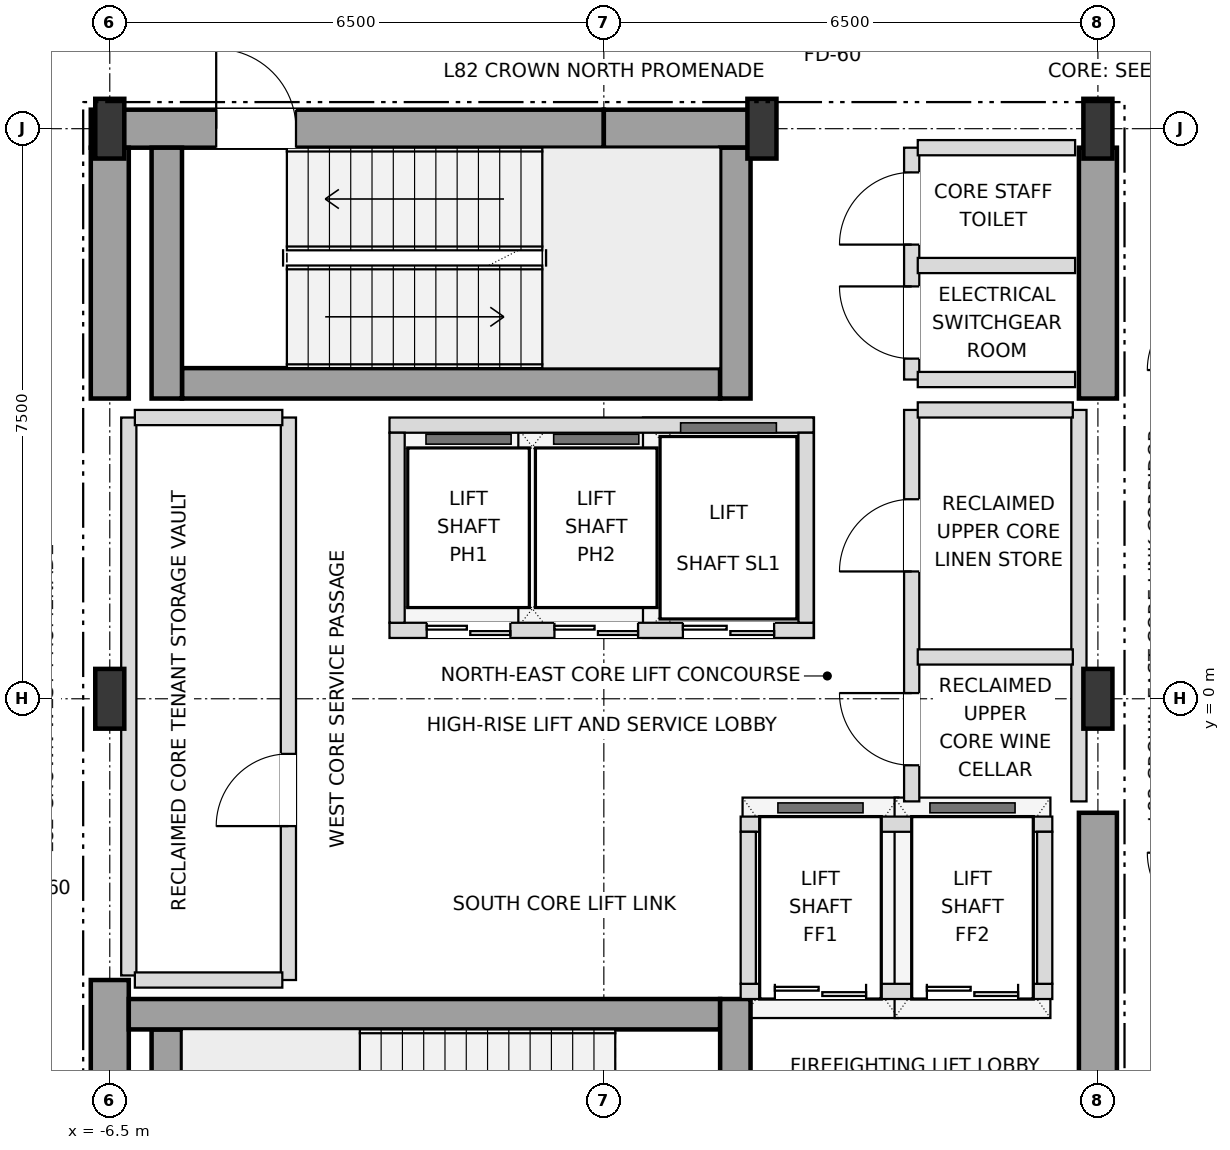
"""IFC4 building model, lengths in metres.
Left out: names, types, materials, properties, quantities, classifications, styles, units other than length and angle.
Written with IfcOpenShell. Run it as: python <this file> out.ifc"""

import sys

from ifc_helpers import new_model, si_unit, direction, frame, frame_2d, origin, origin_2d, place, context, subcontext, project, spatial, rectangle, i_section, extrude, element, fill, save


model = new_model("IFC4")
c1 = context("Model", 3, precision=1e-05, world=origin(), true_north=direction((0.0, 1.0)))
c2 = subcontext(c1, "Body", "Model", "MODEL_VIEW")
j1 = project(units=[si_unit("LENGTHUNIT", "METRE"), si_unit("PLANEANGLEUNIT", "RADIAN")], contexts=[c1])
p1 = place(None, origin())
s1 = spatial("IfcSite", under=j1, at=p1, CompositionType="ELEMENT")
p2 = place(p1, origin())
s2 = spatial("IfcBuilding", under=s1, at=p2, CompositionType="ELEMENT")
p3 = place(p2, frame((0.0, 0.0, 314.4)))
s3 = spatial("IfcBuildingStorey", under=s2, at=p3, CompositionType="ELEMENT", Elevation=314.4)
for number, where, z_axis, x_axis in (
    (1, (-6.5, 0.0, 0.0), (0.0, 0.0, 1.0), (1.0, 0.0, 0.0)),
    (2, (6.5, 0.0, 0.0), (0.0, 0.0, 1.0), (1.0, 0.0, 0.0)),
    (3, (-6.5, 7.5, 0.0), (0.0, 0.0, 1.0), (1.0, 0.0, 0.0)),
    (4, (2.08, 7.5, 0.0), (0.0, 0.0, 1.0), (1.0, 0.0, 0.0)),
    (5, (6.5, 7.5, 0.0), (0.0, 0.0, 1.0), (1.0, 0.0, 0.0)),
):
    element("IfcColumn", number, at=place(p3, frame(where, z_axis=z_axis, x_axis=x_axis)), inside=s3, PredefinedType="COLUMN", context=c2, shape_type="SweptSolid", body=[
        extrude(i_section(OverallWidth=0.382, OverallDepth=0.786, WebThickness=0.02, FlangeThickness=0.033, at=origin_2d()), origin(), (0.0, 0.0, 1.0), 4.5),
    ])
p4 = place(p3, frame((-6.75, 7.5, 0.0), z_axis=(0.0, 0.0, 1.0), x_axis=(1.0, 0.0, 0.0)))
e6 = element("IfcWall", 6, at=p4, inside=s3, PredefinedType="SHEAR", context=c2, shape_type="SweptSolid", body=[
    extrude(rectangle(XDim=6.75, YDim=0.5, at=frame_2d((3.375, 0.0))), origin(), (0.0, 0.0, 1.0), 4.25),
])
p5 = place(p4, frame((1.65, 0.0, 0.0)))
e7 = element("IfcOpeningElement", 7, at=p5, cuts=e6, PredefinedType="OPENING", context=c2, shape_type="SweptSolid", body=[
    extrude(rectangle(XDim=1.05, YDim=2.15, at=frame_2d((0.525, 1.075))), frame((0.0, 0.26, 0.0), z_axis=(0.0, -1.0, 0.0), x_axis=(1.0, 0.0, 0.0)), (0.0, 0.0, 1.0), 0.52),
])
p6 = place(p3, frame((0.0, 7.5, 0.0), z_axis=(0.0, 0.0, 1.0), x_axis=(1.0, 0.0, 0.0)))
e8 = element("IfcWall", 8, at=p6, inside=s3, PredefinedType="SHEAR", context=c2, shape_type="SweptSolid", body=[
    extrude(rectangle(XDim=2.08, YDim=0.5, at=frame_2d((1.04, 0.0))), origin(), (0.0, 0.0, 1.0), 4.25),
])
p7 = place(p3, frame((-6.5, -7.25, 0.0), z_axis=(0.0, 0.0, 1.0), x_axis=(0.0, 1.0, 0.0)))
e9 = element("IfcWall", 9, at=p7, inside=s3, PredefinedType="SHEAR", context=c2, shape_type="SweptSolid", body=[
    extrude(rectangle(XDim=3.55, YDim=0.5, at=frame_2d((1.775, 0.0))), origin(), (0.0, 0.0, 1.0), 4.25),
])
p8 = place(p3, frame((-6.5, 3.95, 0.0), z_axis=(0.0, 0.0, 1.0), x_axis=(0.0, 1.0, 0.0)))
e10 = element("IfcWall", 10, at=p8, inside=s3, PredefinedType="SHEAR", context=c2, shape_type="SweptSolid", body=[
    extrude(rectangle(XDim=3.3, YDim=0.5, at=frame_2d((1.65, 0.0))), origin(), (0.0, 0.0, 1.0), 4.25),
])
p9 = place(p3, frame((6.5, -7.25, 0.0), z_axis=(0.0, 0.0, 1.0), x_axis=(0.0, 1.0, 0.0)))
e11 = element("IfcWall", 11, at=p9, inside=s3, PredefinedType="SHEAR", context=c2, shape_type="SweptSolid", body=[
    extrude(rectangle(XDim=5.75, YDim=0.5, at=frame_2d((2.875, 0.0))), origin(), (0.0, 0.0, 1.0), 4.25),
])
p10 = place(p9, frame((0.85, 0.0, 0.0)))
e12 = element("IfcOpeningElement", 12, at=p10, cuts=e11, PredefinedType="OPENING", context=c2, shape_type="SweptSolid", body=[
    extrude(rectangle(XDim=1.05, YDim=2.15, at=frame_2d((0.525, 1.075))), frame((0.0, 0.26, 0.0), z_axis=(0.0, -1.0, 0.0), x_axis=(1.0, 0.0, 0.0)), (0.0, 0.0, 1.0), 0.52),
])
p11 = place(p3, frame((6.5, 3.95, 0.0), z_axis=(0.0, 0.0, 1.0), x_axis=(0.0, 1.0, 0.0)))
e13 = element("IfcWall", 13, at=p11, inside=s3, PredefinedType="SHEAR", context=c2, shape_type="SweptSolid", body=[
    extrude(rectangle(XDim=3.3, YDim=0.5, at=frame_2d((1.65, 0.0))), origin(), (0.0, 0.0, 1.0), 4.25),
])
p12 = place(p3, frame((-5.75, -7.25, 0.0), z_axis=(0.0, 0.0, 1.0), x_axis=(0.0, 1.0, 0.0)))
e14 = element("IfcWall", 14, at=p12, inside=s3, PredefinedType="SHEAR", context=c2, shape_type="SweptSolid", body=[
    extrude(rectangle(XDim=2.9, YDim=0.4, at=frame_2d((1.45, 0.0))), origin(), (0.0, 0.0, 1.0), 4.25),
])
p13 = place(p3, frame((-6.25, -4.15, 0.0), z_axis=(0.0, 0.0, 1.0), x_axis=(1.0, 0.0, 0.0)))
e15 = element("IfcWall", 15, at=p13, inside=s3, PredefinedType="SHEAR", context=c2, shape_type="SweptSolid", body=[
    extrude(rectangle(XDim=7.78, YDim=0.4, at=frame_2d((3.89, 0.0))), origin(), (0.0, 0.0, 1.0), 4.25),
])
p14 = place(p3, frame((1.73, -7.25, 0.0), z_axis=(0.0, 0.0, 1.0), x_axis=(0.0, 1.0, 0.0)))
e16 = element("IfcWall", 16, at=p14, inside=s3, PredefinedType="SHEAR", context=c2, shape_type="SweptSolid", body=[
    extrude(rectangle(XDim=3.3, YDim=0.4, at=frame_2d((1.65, 0.0))), origin(), (0.0, 0.0, 1.0), 4.25),
])
p15 = place(p14, frame((0.9, 0.0, 0.0)))
e17 = element("IfcOpeningElement", 17, at=p15, cuts=e16, PredefinedType="OPENING", context=c2, shape_type="SweptSolid", body=[
    extrude(rectangle(XDim=1.05, YDim=2.15, at=frame_2d((0.525, 1.075))), frame((0.0, 0.21, 0.0), z_axis=(0.0, -1.0, 0.0), x_axis=(1.0, 0.0, 0.0)), (0.0, 0.0, 1.0), 0.42),
])
p16 = place(p3, frame((-5.55, 4.15, 0.0), z_axis=(0.0, 0.0, 1.0), x_axis=(1.0, 0.0, 0.0)))
e18 = element("IfcWall", 18, at=p16, inside=s3, PredefinedType="SHEAR", context=c2, shape_type="SweptSolid", body=[
    extrude(rectangle(XDim=7.08, YDim=0.4, at=frame_2d((3.54, 0.0))), origin(), (0.0, 0.0, 1.0), 4.25),
])
for number, where, z_axis, x_axis in (
    (19, (1.73, 3.95, 0.0), (0.0, 0.0, 1.0), (0.0, 1.0, 0.0)),
    (20, (-5.75, 3.95, 0.0), (0.0, 0.0, 1.0), (0.0, 1.0, 0.0)),
):
    element("IfcWall", number, at=place(p3, frame(where, z_axis=z_axis, x_axis=x_axis)), inside=s3, PredefinedType="SHEAR", context=c2, shape_type="SweptSolid", body=[
        extrude(rectangle(XDim=3.3, YDim=0.4, at=frame_2d((1.65, 0.0))), origin(), (0.0, 0.0, 1.0), 4.25),
    ])
p17 = place(p3, frame((-2.82, 0.9, 0.0), z_axis=(0.0, 0.0, 1.0), x_axis=(1.0, 0.0, 0.0)))
e21 = element("IfcWall", 21, at=p17, inside=s3, PredefinedType="SOLIDWALL", context=c2, shape_type="SweptSolid", body=[
    extrude(rectangle(XDim=5.58, YDim=0.2, at=frame_2d((2.79, 0.0))), origin(), (0.0, 0.0, 1.0), 4.25),
])
p18 = place(p17, frame((0.49, 0.0, 0.0)))
e22 = element("IfcOpeningElement", 22, at=p18, cuts=e21, PredefinedType="OPENING", context=c2, shape_type="SweptSolid", body=[
    extrude(rectangle(XDim=1.1, YDim=2.15, at=frame_2d((0.55, 1.075))), frame((0.0, 0.11, 0.0), z_axis=(0.0, -1.0, 0.0), x_axis=(1.0, 0.0, 0.0)), (0.0, 0.0, 1.0), 0.22),
])
p19 = place(p17, frame((2.17, 0.0, 0.0)))
e23 = element("IfcOpeningElement", 23, at=p19, cuts=e21, PredefinedType="OPENING", context=c2, shape_type="SweptSolid", body=[
    extrude(rectangle(XDim=1.1, YDim=2.15, at=frame_2d((0.55, 1.075))), frame((0.0, 0.11, 0.0), z_axis=(0.0, -1.0, 0.0), x_axis=(1.0, 0.0, 0.0)), (0.0, 0.0, 1.0), 0.22),
])
p20 = place(p17, frame((3.86, 0.0, 0.0)))
e24 = element("IfcOpeningElement", 24, at=p20, cuts=e21, PredefinedType="OPENING", context=c2, shape_type="SweptSolid", body=[
    extrude(rectangle(XDim=1.2, YDim=2.2, at=frame_2d((0.6, 1.1))), frame((0.0, 0.11, 0.0), z_axis=(0.0, -1.0, 0.0), x_axis=(1.0, 0.0, 0.0)), (0.0, 0.0, 1.0), 0.22),
])
p21 = place(p3, frame((-2.82, 3.6, 0.0), z_axis=(0.0, 0.0, 1.0), x_axis=(1.0, 0.0, 0.0)))
e25 = element("IfcWall", 25, at=p21, inside=s3, PredefinedType="SOLIDWALL", context=c2, shape_type="SweptSolid", body=[
    extrude(rectangle(XDim=5.58, YDim=0.2, at=frame_2d((2.79, 0.0))), origin(), (0.0, 0.0, 1.0), 4.25),
])
for number, where, z_axis, x_axis in (
    (26, (-2.72, 1.0, 0.0), (0.0, 0.0, 1.0), (0.0, 1.0, 0.0)),
    (27, (2.66, 1.0, 0.0), (0.0, 0.0, 1.0), (0.0, 1.0, 0.0)),
):
    element("IfcWall", number, at=place(p3, frame(where, z_axis=z_axis, x_axis=x_axis)), inside=s3, PredefinedType="SOLIDWALL", context=c2, shape_type="SweptSolid", body=[
        extrude(rectangle(XDim=2.5, YDim=0.2, at=frame_2d((1.25, 0.0))), origin(), (0.0, 0.0, 1.0), 4.25),
    ])
p22 = place(p3, frame((1.8, -3.85, 0.0), z_axis=(0.0, 0.0, 1.0), x_axis=(1.0, 0.0, 0.0)))
e28 = element("IfcWall", 28, at=p22, inside=s3, PredefinedType="SOLIDWALL", context=c2, shape_type="SweptSolid", body=[
    extrude(rectangle(XDim=4.1, YDim=0.2, at=frame_2d((2.05, 0.0))), origin(), (0.0, 0.0, 1.0), 4.25),
])
p23 = place(p22, frame((0.45, 0.0, 0.0)))
e29 = element("IfcOpeningElement", 29, at=p23, cuts=e28, PredefinedType="OPENING", context=c2, shape_type="SweptSolid", body=[
    extrude(rectangle(XDim=1.2, YDim=2.2, at=frame_2d((0.6, 1.1))), frame((0.0, 0.11, 0.0), z_axis=(0.0, -1.0, 0.0), x_axis=(1.0, 0.0, 0.0)), (0.0, 0.0, 1.0), 0.22),
])
p24 = place(p22, frame((2.45, 0.0, 0.0)))
e30 = element("IfcOpeningElement", 30, at=p24, cuts=e28, PredefinedType="OPENING", context=c2, shape_type="SweptSolid", body=[
    extrude(rectangle(XDim=1.2, YDim=2.2, at=frame_2d((0.6, 1.1))), frame((0.0, 0.11, 0.0), z_axis=(0.0, -1.0, 0.0), x_axis=(1.0, 0.0, 0.0)), (0.0, 0.0, 1.0), 0.22),
])
p25 = place(p3, frame((1.8, -1.65, 0.0), z_axis=(0.0, 0.0, 1.0), x_axis=(1.0, 0.0, 0.0)))
e31 = element("IfcWall", 31, at=p25, inside=s3, PredefinedType="SOLIDWALL", context=c2, shape_type="SweptSolid", body=[
    extrude(rectangle(XDim=4.1, YDim=0.2, at=frame_2d((2.05, 0.0))), origin(), (0.0, 0.0, 1.0), 4.25),
])
for number, where, z_axis, x_axis in (
    (32, (1.9, -3.75, 0.0), (0.0, 0.0, 1.0), (0.0, 1.0, 0.0)),
    (33, (5.8, -3.75, 0.0), (0.0, 0.0, 1.0), (0.0, 1.0, 0.0)),
):
    element("IfcWall", number, at=place(p3, frame(where, z_axis=z_axis, x_axis=x_axis)), inside=s3, PredefinedType="SOLIDWALL", context=c2, shape_type="SweptSolid", body=[
        extrude(rectangle(XDim=2.0, YDim=0.2, at=frame_2d((1.0, 0.0))), origin(), (0.0, 0.0, 1.0), 4.25),
    ])
p26 = place(p3, frame((-6.25, -3.64, 0.0), z_axis=(0.0, 0.0, 1.0), x_axis=(0.0, 1.0, 0.0)))
e34 = element("IfcWall", 34, at=p26, inside=s3, PredefinedType="SOLIDWALL", context=c2, shape_type="SweptSolid", body=[
    extrude(rectangle(XDim=7.34, YDim=0.2, at=frame_2d((3.67, 0.0))), origin(), (0.0, 0.0, 1.0), 4.25),
])
p27 = place(p3, frame((-4.15, -3.7, 0.0), z_axis=(0.0, 0.0, 1.0), x_axis=(0.0, 1.0, 0.0)))
e35 = element("IfcWall", 35, at=p27, inside=s3, PredefinedType="SOLIDWALL", context=c2, shape_type="SweptSolid", body=[
    extrude(rectangle(XDim=7.4, YDim=0.2, at=frame_2d((3.7, 0.0))), origin(), (0.0, 0.0, 1.0), 4.25),
])
p28 = place(p27, frame((2.025, 0.0, 0.0)))
e36 = element("IfcOpeningElement", 36, at=p28, cuts=e35, PredefinedType="OPENING", context=c2, shape_type="SweptSolid", body=[
    extrude(rectangle(XDim=0.95, YDim=2.15, at=frame_2d((0.475, 1.075))), frame((0.0, 0.11, 0.0), z_axis=(0.0, -1.0, 0.0), x_axis=(1.0, 0.0, 0.0)), (0.0, 0.0, 1.0), 0.22),
])
p29 = place(p3, frame((4.05, -1.35, 0.0), z_axis=(0.0, 0.0, 1.0), x_axis=(0.0, 1.0, 0.0)))
e37 = element("IfcWall", 37, at=p29, inside=s3, PredefinedType="SOLIDWALL", context=c2, shape_type="SweptSolid", body=[
    extrude(rectangle(XDim=5.15, YDim=0.2, at=frame_2d((2.575, 0.0))), origin(), (0.0, 0.0, 1.0), 4.25),
])
p30 = place(p29, frame((0.475, 0.0, 0.0)))
e38 = element("IfcOpeningElement", 38, at=p30, cuts=e37, PredefinedType="OPENING", context=c2, shape_type="SweptSolid", body=[
    extrude(rectangle(XDim=0.95, YDim=2.15, at=frame_2d((0.475, 1.075))), frame((0.0, 0.11, 0.0), z_axis=(0.0, -1.0, 0.0), x_axis=(1.0, 0.0, 0.0)), (0.0, 0.0, 1.0), 0.22),
])
p31 = place(p29, frame((3.025, 0.0, 0.0)))
e39 = element("IfcOpeningElement", 39, at=p31, cuts=e37, PredefinedType="OPENING", context=c2, shape_type="SweptSolid", body=[
    extrude(rectangle(XDim=0.95, YDim=2.15, at=frame_2d((0.475, 1.075))), frame((0.0, 0.11, 0.0), z_axis=(0.0, -1.0, 0.0), x_axis=(1.0, 0.0, 0.0)), (0.0, 0.0, 1.0), 0.22),
])
p32 = place(p3, frame((4.05, 4.2, 0.0), z_axis=(0.0, 0.0, 1.0), x_axis=(0.0, 1.0, 0.0)))
e40 = element("IfcWall", 40, at=p32, inside=s3, PredefinedType="SOLIDWALL", context=c2, shape_type="SweptSolid", body=[
    extrude(rectangle(XDim=3.05, YDim=0.2, at=frame_2d((1.525, 0.0))), origin(), (0.0, 0.0, 1.0), 4.25),
])
p33 = place(p32, frame((0.275, 0.0, 0.0)))
e41 = element("IfcOpeningElement", 41, at=p33, cuts=e40, PredefinedType="OPENING", context=c2, shape_type="SweptSolid", body=[
    extrude(rectangle(XDim=0.95, YDim=2.15, at=frame_2d((0.475, 1.075))), frame((0.0, 0.11, 0.0), z_axis=(0.0, -1.0, 0.0), x_axis=(1.0, 0.0, 0.0)), (0.0, 0.0, 1.0), 0.22),
])
p34 = place(p32, frame((1.775, 0.0, 0.0)))
e42 = element("IfcOpeningElement", 42, at=p34, cuts=e40, PredefinedType="OPENING", context=c2, shape_type="SweptSolid", body=[
    extrude(rectangle(XDim=0.95, YDim=2.15, at=frame_2d((0.475, 1.075))), frame((0.0, 0.11, 0.0), z_axis=(0.0, -1.0, 0.0), x_axis=(1.0, 0.0, 0.0)), (0.0, 0.0, 1.0), 0.22),
])
p35 = place(p3, frame((6.25, -1.35, 0.0), z_axis=(0.0, 0.0, 1.0), x_axis=(0.0, 1.0, 0.0)))
e43 = element("IfcWall", 43, at=p35, inside=s3, PredefinedType="SOLIDWALL", context=c2, shape_type="SweptSolid", body=[
    extrude(rectangle(XDim=5.15, YDim=0.2, at=frame_2d((2.575, 0.0))), origin(), (0.0, 0.0, 1.0), 4.25),
])
p36 = place(p3, frame((-6.17, -3.7, 0.0), z_axis=(0.0, 0.0, 1.0), x_axis=(1.0, 0.0, 0.0)))
e44 = element("IfcWall", 44, at=p36, inside=s3, PredefinedType="SOLIDWALL", context=c2, shape_type="SweptSolid", body=[
    extrude(rectangle(XDim=1.94, YDim=0.2, at=frame_2d((0.97, 0.0))), origin(), (0.0, 0.0, 1.0), 4.25),
])
p37 = place(p3, frame((4.13, 0.55, 0.0), z_axis=(0.0, 0.0, 1.0), x_axis=(1.0, 0.0, 0.0)))
e45 = element("IfcWall", 45, at=p37, inside=s3, PredefinedType="SOLIDWALL", context=c2, shape_type="SweptSolid", body=[
    extrude(rectangle(XDim=2.04, YDim=0.2, at=frame_2d((1.02, 0.0))), origin(), (0.0, 0.0, 1.0), 4.25),
])
p38 = place(p3, frame((-6.17, 3.7, 0.0), z_axis=(0.0, 0.0, 1.0), x_axis=(1.0, 0.0, 0.0)))
e46 = element("IfcWall", 46, at=p38, inside=s3, PredefinedType="SOLIDWALL", context=c2, shape_type="SweptSolid", body=[
    extrude(rectangle(XDim=1.94, YDim=0.2, at=frame_2d((0.97, 0.0))), origin(), (0.0, 0.0, 1.0), 4.25),
])
p39 = place(p3, frame((4.13, 3.8, 0.0), z_axis=(0.0, 0.0, 1.0), x_axis=(1.0, 0.0, 0.0)))
e47 = element("IfcWall", 47, at=p39, inside=s3, PredefinedType="SOLIDWALL", context=c2, shape_type="SweptSolid", body=[
    extrude(rectangle(XDim=2.04, YDim=0.2, at=frame_2d((1.02, 0.0))), origin(), (0.0, 0.0, 1.0), 4.25),
])
for number, where, z_axis, x_axis in (
    (48, (4.13, 4.2, 0.0), (0.0, 0.0, 1.0), (1.0, 0.0, 0.0)),
    (49, (4.13, 5.7, 0.0), (0.0, 0.0, 1.0), (1.0, 0.0, 0.0)),
    (50, (4.13, 7.25, 0.0), (0.0, 0.0, 1.0), (1.0, 0.0, 0.0)),
):
    element("IfcWall", number, at=place(p3, frame(where, z_axis=z_axis, x_axis=x_axis)), inside=s3, PredefinedType="SOLIDWALL", context=c2, shape_type="SweptSolid", body=[
        extrude(rectangle(XDim=2.07, YDim=0.2, at=frame_2d((1.035, 0.0))), origin(), (0.0, 0.0, 1.0), 4.25),
    ])
p40 = place(p5, origin())
e51 = element("IfcDoor", 51, at=p40, inside=s3, OperationType="SINGLE_SWING_LEFT", PredefinedType="DOOR", context=c2, shape_type="SweptSolid", body=[
    extrude(rectangle(XDim=1.05, YDim=2.15, at=frame_2d((0.525, 1.075))), frame((0.0, 0.025, 0.0), z_axis=(0.0, -1.0, 0.0), x_axis=(1.0, 0.0, 0.0)), (0.0, 0.0, 1.0), 0.05),
])
fill(e7, e51)
p41 = place(p18, origin())
e52 = element("IfcDoor", 52, at=p41, inside=s3, OperationType="DOUBLE_DOOR_SLIDING", PredefinedType="DOOR", context=c2, shape_type="SweptSolid", body=[
    extrude(rectangle(XDim=1.1, YDim=2.15, at=frame_2d((0.55, 1.075))), frame((0.0, 0.025, 0.0), z_axis=(0.0, -1.0, 0.0), x_axis=(1.0, 0.0, 0.0)), (0.0, 0.0, 1.0), 0.05),
])
fill(e22, e52)
p42 = place(p19, origin())
e53 = element("IfcDoor", 53, at=p42, inside=s3, OperationType="DOUBLE_DOOR_SLIDING", PredefinedType="DOOR", context=c2, shape_type="SweptSolid", body=[
    extrude(rectangle(XDim=1.1, YDim=2.15, at=frame_2d((0.55, 1.075))), frame((0.0, 0.025, 0.0), z_axis=(0.0, -1.0, 0.0), x_axis=(1.0, 0.0, 0.0)), (0.0, 0.0, 1.0), 0.05),
])
fill(e23, e53)
p43 = place(p20, origin())
e54 = element("IfcDoor", 54, at=p43, inside=s3, OperationType="DOUBLE_DOOR_SLIDING", PredefinedType="DOOR", context=c2, shape_type="SweptSolid", body=[
    extrude(rectangle(XDim=1.2, YDim=2.2, at=frame_2d((0.6, 1.1))), frame((0.0, 0.025, 0.0), z_axis=(0.0, -1.0, 0.0), x_axis=(1.0, 0.0, 0.0)), (0.0, 0.0, 1.0), 0.05),
])
fill(e24, e54)
p44 = place(p23, origin())
e55 = element("IfcDoor", 55, at=p44, inside=s3, OperationType="DOUBLE_DOOR_SLIDING", PredefinedType="DOOR", context=c2, shape_type="SweptSolid", body=[
    extrude(rectangle(XDim=1.2, YDim=2.2, at=frame_2d((0.6, 1.1))), frame((0.0, 0.025, 0.0), z_axis=(0.0, -1.0, 0.0), x_axis=(1.0, 0.0, 0.0)), (0.0, 0.0, 1.0), 0.05),
])
fill(e29, e55)
p45 = place(p24, origin())
e56 = element("IfcDoor", 56, at=p45, inside=s3, OperationType="DOUBLE_DOOR_SLIDING", PredefinedType="DOOR", context=c2, shape_type="SweptSolid", body=[
    extrude(rectangle(XDim=1.2, YDim=2.2, at=frame_2d((0.6, 1.1))), frame((0.0, 0.025, 0.0), z_axis=(0.0, -1.0, 0.0), x_axis=(1.0, 0.0, 0.0)), (0.0, 0.0, 1.0), 0.05),
])
fill(e30, e56)
p46 = place(p28, origin())
e57 = element("IfcDoor", 57, at=p46, inside=s3, OperationType="SINGLE_SWING_LEFT", PredefinedType="DOOR", context=c2, shape_type="SweptSolid", body=[
    extrude(rectangle(XDim=0.95, YDim=2.15, at=frame_2d((0.475, 1.075))), frame((0.0, 0.025, 0.0), z_axis=(0.0, -1.0, 0.0), x_axis=(1.0, 0.0, 0.0)), (0.0, 0.0, 1.0), 0.05),
])
fill(e36, e57)
p47 = place(p30, origin())
e58 = element("IfcDoor", 58, at=p47, inside=s3, OperationType="SINGLE_SWING_RIGHT", PredefinedType="DOOR", context=c2, shape_type="SweptSolid", body=[
    extrude(rectangle(XDim=0.95, YDim=2.15, at=frame_2d((0.475, 1.075))), frame((0.0, 0.025, 0.0), z_axis=(0.0, -1.0, 0.0), x_axis=(1.0, 0.0, 0.0)), (0.0, 0.0, 1.0), 0.05),
])
fill(e38, e58)
p48 = place(p31, origin())
e59 = element("IfcDoor", 59, at=p48, inside=s3, OperationType="SINGLE_SWING_LEFT", PredefinedType="DOOR", context=c2, shape_type="SweptSolid", body=[
    extrude(rectangle(XDim=0.95, YDim=2.15, at=frame_2d((0.475, 1.075))), frame((0.0, 0.025, 0.0), z_axis=(0.0, -1.0, 0.0), x_axis=(1.0, 0.0, 0.0)), (0.0, 0.0, 1.0), 0.05),
])
fill(e39, e59)
p49 = place(p33, origin())
e60 = element("IfcDoor", 60, at=p49, inside=s3, OperationType="SINGLE_SWING_RIGHT", PredefinedType="DOOR", context=c2, shape_type="SweptSolid", body=[
    extrude(rectangle(XDim=0.95, YDim=2.15, at=frame_2d((0.475, 1.075))), frame((0.0, 0.025, 0.0), z_axis=(0.0, -1.0, 0.0), x_axis=(1.0, 0.0, 0.0)), (0.0, 0.0, 1.0), 0.05),
])
fill(e41, e60)
p50 = place(p34, origin())
e61 = element("IfcDoor", 61, at=p50, inside=s3, OperationType="SINGLE_SWING_LEFT", PredefinedType="DOOR", context=c2, shape_type="SweptSolid", body=[
    extrude(rectangle(XDim=0.95, YDim=2.15, at=frame_2d((0.475, 1.075))), frame((0.0, 0.025, 0.0), z_axis=(0.0, -1.0, 0.0), x_axis=(1.0, 0.0, 0.0)), (0.0, 0.0, 1.0), 0.05),
])
fill(e42, e61)
save(model, sys.argv[1])
